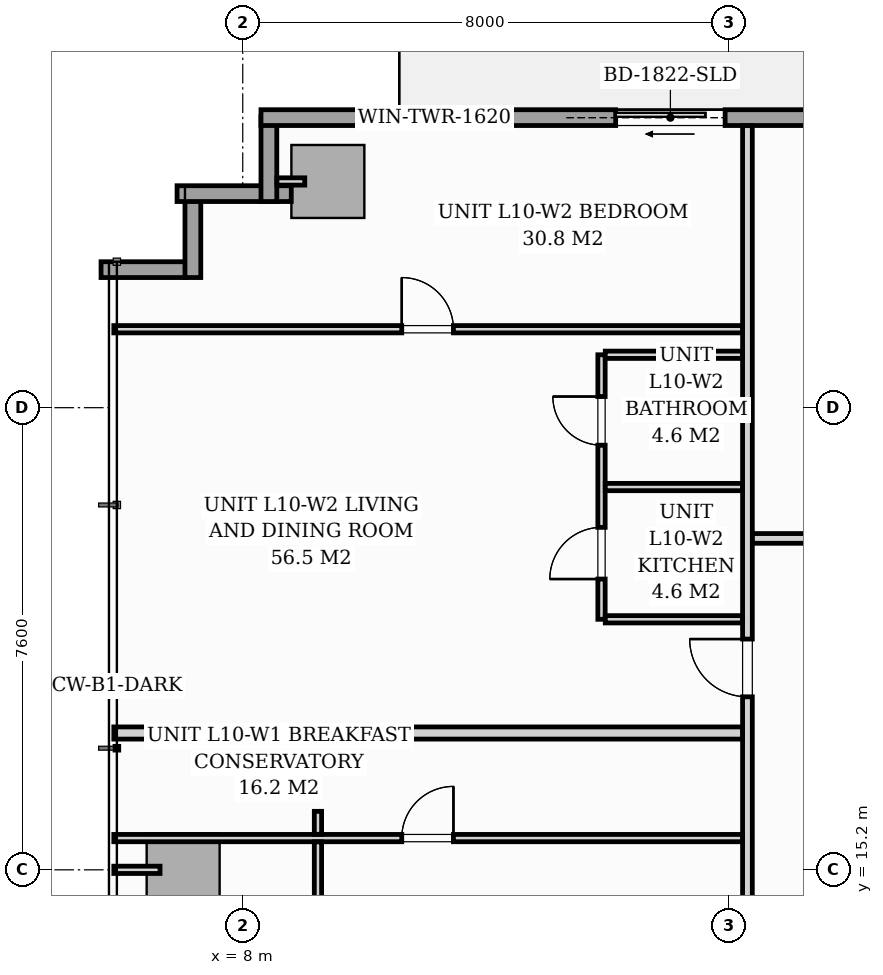
"""IFC4 building model, lengths in metres.
Left out: names, types, materials, properties, quantities, classifications, styles, units other than length and angle.
Written with IfcOpenShell. Run it as: python <this file> out.ifc"""

import sys

from ifc_helpers import new_model, si_unit, direction, frame, frame_2d, origin, origin_2d, place, context, subcontext, project, spatial, rectangle, extrude, source, transform, mapped, element, fill, save


model = new_model("IFC4")
c1 = context("Model", 3, precision=1e-05, world=origin(), true_north=direction((0.0, 1.0)))
c2 = subcontext(c1, "Body", "Model", "MODEL_VIEW")
j1 = project(units=[si_unit("LENGTHUNIT", "METRE"), si_unit("PLANEANGLEUNIT", "RADIAN")], contexts=[c1])
p1 = place(None, origin())
s1 = spatial("IfcSite", under=j1, at=p1, CompositionType="ELEMENT")
p2 = place(p1, origin())
s2 = spatial("IfcBuilding", under=s1, at=p2, CompositionType="ELEMENT")
p3 = place(p2, frame((0.0, 0.0, 39.0)))
s3 = spatial("IfcBuildingStorey", under=s2, at=p3, CompositionType="ELEMENT", Elevation=39.0)
m1 = source(origin(), c2, "Body", "SweptSolid", [
    extrude(rectangle(XDim=1.2, YDim=1.2, at=origin_2d()), origin(), (0.0, 0.0, 1.0), 3.196),
])
for number, where, z_axis, x_axis in (
    (1, (9.4, 26.52, 0.002), (0.0, 0.0, 1.0), (1.0, 0.0, 0.0)),
    (2, (7.02, 15.2, 0.002), (0.0, 0.0, 1.0), (1.0, 0.0, 0.0)),
):
    element("IfcColumn", number, at=place(p3, frame(where, z_axis=z_axis, x_axis=x_axis)), inside=s3, PredefinedType="COLUMN", context=c2, shape_type="MappedRepresentation", body=[
        mapped(m1, transform((0.0, 0.0, 0.0), scale=1.0)),
    ])
for number, where, z_axis, x_axis in (
    (3, (5.67, 25.07, 0.0), (0.0, 0.0, 1.0), (1.0, 0.0, 0.0)),
    (4, (7.18, 24.94, 0.0), (0.0, 0.0, 1.0), (0.0, 1.0, 0.0)),
):
    element("IfcWall", number, at=place(p3, frame(where, z_axis=z_axis, x_axis=x_axis)), inside=s3, PredefinedType="STANDARD", context=c2, shape_type="SweptSolid", body=[
        extrude(rectangle(XDim=1.395, YDim=0.26, at=frame_2d((0.698, 0.0))), origin(), (0.0, 0.0, 1.0), 2.94),
    ])
p4 = place(p3, frame((6.92, 26.32, 0.0), z_axis=(0.0, 0.0, 1.0), x_axis=(1.0, 0.0, 0.0)))
e5 = element("IfcWall", 5, at=p4, inside=s3, PredefinedType="STANDARD", context=c2, shape_type="SweptSolid", body=[
    extrude(rectangle(XDim=1.878, YDim=0.26, at=frame_2d((0.939, 0.0))), origin(), (0.0, 0.0, 1.0), 2.94),
])
p5 = place(p3, frame((8.43, 26.19, 0.0), z_axis=(0.0, 0.0, 1.0), x_axis=(0.0, 1.0, 0.0)))
e6 = element("IfcWall", 6, at=p5, inside=s3, PredefinedType="STANDARD", context=c2, shape_type="SweptSolid", body=[
    extrude(rectangle(XDim=1.395, YDim=0.26, at=frame_2d((0.698, 0.0))), origin(), (0.0, 0.0, 1.0), 2.94),
])
p6 = place(p3, frame((8.3, 27.57, 0.0), z_axis=(0.0, 0.0, 1.0), x_axis=(1.0, 0.0, 0.0)))
e7 = element("IfcWall", 7, at=p6, inside=s3, PredefinedType="STANDARD", context=c2, shape_type="SweptSolid", body=[
    extrude(rectangle(XDim=17.15, YDim=0.26, at=frame_2d((8.575, 0.0))), origin(), (0.0, 0.0, 1.0), 2.94),
])
p7 = place(p6, frame((5.833, 0.0, 0.0)))
e8 = element("IfcOpeningElement", 8, at=p7, cuts=e7, PredefinedType="OPENING", context=c2, shape_type="SweptSolid", body=[
    extrude(rectangle(XDim=1.8, YDim=2.06, at=frame_2d((0.9, 1.03))), frame((0.0, 0.14, 0.0), z_axis=(0.0, -1.0, 0.0), x_axis=(1.0, 0.0, 0.0)), (0.0, 0.0, 1.0), 0.28),
])
p8 = place(p6, frame((2.05, 0.0, 0.65)))
e9 = element("IfcOpeningElement", 9, at=p8, cuts=e7, PredefinedType="OPENING", context=c2, shape_type="SweptSolid", body=[
    extrude(rectangle(XDim=1.6, YDim=1.5, at=frame_2d((0.8, 0.75))), frame((0.0, 0.14, 0.0), z_axis=(0.0, -1.0, 0.0), x_axis=(1.0, 0.0, 0.0)), (0.0, 0.0, 1.0), 0.28),
])
p9 = place(p3, frame((16.3, 12.572, 0.0), z_axis=(0.0, 0.0, 1.0), x_axis=(0.0, 1.0, 0.0)))
e10 = element("IfcWall", 10, at=p9, inside=s3, PredefinedType="PARTITIONING", context=c2, shape_type="SweptSolid", body=[
    extrude(rectangle(XDim=14.866, YDim=0.16, at=frame_2d((7.433, 0.0))), origin(), (0.0, 0.0, 1.0), 2.94),
])
p10 = place(p9, frame((0.493, 0.0, 0.0)))
e11 = element("IfcOpeningElement", 11, at=p10, cuts=e10, PredefinedType="OPENING", context=c2, shape_type="SweptSolid", body=[
    extrude(rectangle(XDim=0.95, YDim=2.06, at=frame_2d((0.475, 1.03))), frame((0.0, 0.09, 0.0), z_axis=(0.0, -1.0, 0.0), x_axis=(1.0, 0.0, 0.0)), (0.0, 0.0, 1.0), 0.18),
])
p11 = place(p9, frame((5.473, 0.0, 0.0)))
e12 = element("IfcOpeningElement", 12, at=p11, cuts=e10, PredefinedType="OPENING", context=c2, shape_type="SweptSolid", body=[
    extrude(rectangle(XDim=0.95, YDim=2.06, at=frame_2d((0.475, 1.03))), frame((0.0, 0.09, 0.0), z_axis=(0.0, -1.0, 0.0), x_axis=(1.0, 0.0, 0.0)), (0.0, 0.0, 1.0), 0.18),
])
p12 = place(p3, frame((5.88, 17.45, 0.0), z_axis=(0.0, 0.0, 1.0), x_axis=(1.0, 0.0, 0.0)))
e13 = element("IfcWall", 13, at=p12, inside=s3, PredefinedType="PARTITIONING", context=c2, shape_type="SweptSolid", body=[
    extrude(rectangle(XDim=10.338, YDim=0.2, at=frame_2d((5.169, 0.0))), origin(), (0.0, 0.0, 1.0), 2.94),
])
p13 = place(p3, frame((5.88, 15.722, 0.0), z_axis=(0.0, 0.0, 1.0), x_axis=(1.0, 0.0, 0.0)))
e14 = element("IfcWall", 14, at=p13, inside=s3, PredefinedType="PARTITIONING", context=c2, shape_type="SweptSolid", body=[
    extrude(rectangle(XDim=10.338, YDim=0.12, at=frame_2d((5.169, 0.0))), origin(), (0.0, 0.0, 1.0), 2.045),
])
p14 = place(p13, frame((4.735, 0.0, 0.0)))
e15 = element("IfcOpeningElement", 15, at=p14, cuts=e14, PredefinedType="OPENING", context=c2, shape_type="SweptSolid", body=[
    extrude(rectangle(XDim=0.85, YDim=2.01, at=frame_2d((0.425, 1.005))), frame((0.0, 0.07, 0.0), z_axis=(0.0, -1.0, 0.0), x_axis=(1.0, 0.0, 0.0)), (0.0, 0.0, 1.0), 0.14),
])
p15 = place(p3, frame((9.237, 6.028, 0.0), z_axis=(0.0, 0.0, 1.0), x_axis=(0.0, 1.0, 0.0)))
e16 = element("IfcWall", 16, at=p15, inside=s3, PredefinedType="PARTITIONING", context=c2, shape_type="SweptSolid", body=[
    extrude(rectangle(XDim=9.632, YDim=0.12, at=frame_2d((4.816, 0.0))), origin(), (0.0, 0.0, 1.0), 2.94),
])
p16 = place(p15, frame((4.391, 0.0, 0.0)))
e17 = element("IfcOpeningElement", 17, at=p16, cuts=e16, PredefinedType="OPENING", context=c2, shape_type="SweptSolid", body=[
    extrude(rectangle(XDim=0.85, YDim=2.05, at=frame_2d((0.425, 1.025))), frame((0.0, 0.07, 0.0), z_axis=(0.0, -1.0, 0.0), x_axis=(1.0, 0.0, 0.0)), (0.0, 0.0, 1.0), 0.14),
])
p17 = place(p3, frame((9.237, 15.784, 0.0), z_axis=(0.0, 0.0, 1.0), x_axis=(0.0, 1.0, 0.0)))
e18 = element("IfcWall", 18, at=p17, inside=s3, PredefinedType="PARTITIONING", context=c2, shape_type="SweptSolid", body=[
    extrude(rectangle(XDim=0.378, YDim=0.12, at=frame_2d((0.189, 0.0))), origin(), (0.0, 0.0, 1.0), 2.94),
])
p18 = place(p3, frame((13.9, 19.32, 0.0), z_axis=(0.0, 0.0, 1.0), x_axis=(0.0, 1.0, 0.0)))
e19 = element("IfcWall", 19, at=p18, inside=s3, PredefinedType="PARTITIONING", context=c2, shape_type="SweptSolid", body=[
    extrude(rectangle(XDim=4.35, YDim=0.12, at=frame_2d((2.175, 0.0))), origin(), (0.0, 0.0, 1.0), 2.94),
])
p19 = place(p18, frame((0.662, 0.0, 0.0)))
e20 = element("IfcOpeningElement", 20, at=p19, cuts=e19, PredefinedType="OPENING", context=c2, shape_type="SweptSolid", body=[
    extrude(rectangle(XDim=0.85, YDim=2.05, at=frame_2d((0.425, 1.025))), frame((0.0, 0.07, 0.0), z_axis=(0.0, -1.0, 0.0), x_axis=(1.0, 0.0, 0.0)), (0.0, 0.0, 1.0), 0.14),
])
p20 = place(p18, frame((2.863, 0.0, 0.0)))
e21 = element("IfcOpeningElement", 21, at=p20, cuts=e19, PredefinedType="OPENING", context=c2, shape_type="SweptSolid", body=[
    extrude(rectangle(XDim=0.8, YDim=2.02, at=frame_2d((0.4, 1.01))), frame((0.0, 0.07, 0.0), z_axis=(0.0, -1.0, 0.0), x_axis=(1.0, 0.0, 0.0)), (0.0, 0.0, 1.0), 0.14),
])
for number, where, z_axis, x_axis in (
    (22, (13.962, 21.495, 0.0), (0.0, 0.0, 1.0), (1.0, 0.0, 0.0)),
    (23, (13.962, 19.32, 0.0), (0.0, 0.0, 1.0), (1.0, 0.0, 0.0)),
    (24, (13.962, 23.67, 0.0), (0.0, 0.0, 1.0), (1.0, 0.0, 0.0)),
):
    element("IfcWall", number, at=place(p3, frame(where, z_axis=z_axis, x_axis=x_axis)), inside=s3, PredefinedType="PARTITIONING", context=c2, shape_type="SweptSolid", body=[
        extrude(rectangle(XDim=2.256, YDim=0.12, at=frame_2d((1.128, 0.0))), origin(), (0.0, 0.0, 1.0), 2.94),
    ])
p21 = place(p3, frame((5.88, 24.09, 0.0), z_axis=(0.0, 0.0, 1.0), x_axis=(1.0, 0.0, 0.0)))
e25 = element("IfcWall", 25, at=p21, inside=s3, PredefinedType="PARTITIONING", context=c2, shape_type="SweptSolid", body=[
    extrude(rectangle(XDim=10.338, YDim=0.12, at=frame_2d((5.169, 0.0))), origin(), (0.0, 0.0, 1.0), 2.94),
])
p22 = place(p21, frame((4.735, 0.0, 0.0)))
e26 = element("IfcOpeningElement", 26, at=p22, cuts=e25, PredefinedType="OPENING", context=c2, shape_type="SweptSolid", body=[
    extrude(rectangle(XDim=0.85, YDim=2.05, at=frame_2d((0.425, 1.025))), frame((0.0, 0.07, 0.0), z_axis=(0.0, -1.0, 0.0), x_axis=(1.0, 0.0, 0.0)), (0.0, 0.0, 1.0), 0.14),
])
p23 = place(p3, frame((16.382, 20.65, 0.0), z_axis=(0.0, 0.0, 1.0), x_axis=(1.0, 0.0, 0.0)))
e27 = element("IfcWall", 27, at=p23, inside=s3, PredefinedType="PARTITIONING", context=c2, shape_type="SweptSolid", body=[
    extrude(rectangle(XDim=1.786, YDim=0.16, at=frame_2d((0.893, 0.0))), origin(), (0.0, 0.0, 1.0), 2.94),
])
p24 = place(p3, frame((9.02, 26.52, 0.0), z_axis=(0.0, 0.0, 1.0), x_axis=(-1.0, 0.0, 0.0)))
e28 = element("IfcWall", 28, at=p24, inside=s3, PredefinedType="PARTITIONING", context=c2, shape_type="SweptSolid", body=[
    extrude(rectangle(XDim=0.458, YDim=0.12, at=frame_2d((0.229, 0.0))), origin(), (0.0, 0.0, 1.0), 2.94),
])
p25 = place(p3, frame((6.64, 15.2, 0.0), z_axis=(0.0, 0.0, 1.0), x_axis=(-1.0, 0.0, 0.0)))
e29 = element("IfcWall", 29, at=p25, inside=s3, PredefinedType="PARTITIONING", context=c2, shape_type="SweptSolid", body=[
    extrude(rectangle(XDim=0.76, YDim=0.12, at=frame_2d((0.38, 0.0))), origin(), (0.0, 0.0, 1.0), 2.94),
])
m2 = source(origin(), c2, "Body", "SweptSolid", [
    extrude(rectangle(XDim=1.8, YDim=2.06, at=frame_2d((0.9, 1.03))), frame((0.0, 0.025, 0.0), z_axis=(0.0, -1.0, 0.0), x_axis=(1.0, 0.0, 0.0)), (0.0, 0.0, 1.0), 0.05),
])
p26 = place(p7, origin())
e30 = element("IfcDoor", 30, at=p26, inside=s3, OperationType="SLIDING_TO_LEFT", PredefinedType="DOOR", context=c2, shape_type="MappedRepresentation", body=[
    mapped(m2, transform((0.0, 0.0, 0.0), scale=1.0)),
])
fill(e8, e30)
m3 = source(origin(), c2, "Body", "SweptSolid", [
    extrude(rectangle(XDim=1.6, YDim=1.5, at=frame_2d((0.8, 0.75))), frame((0.0, 0.03, 0.0), z_axis=(0.0, -1.0, 0.0), x_axis=(1.0, 0.0, 0.0)), (0.0, 0.0, 1.0), 0.06),
])
p27 = place(p8, origin())
e31 = element("IfcWindow", 31, at=p27, inside=s3, PartitioningType="SINGLE_PANEL", PredefinedType="WINDOW", context=c2, shape_type="MappedRepresentation", body=[
    mapped(m3, transform((0.0, 0.0, 0.0), scale=1.0)),
])
fill(e9, e31)
m4 = source(origin(), c2, "Body", "SweptSolid", [
    extrude(rectangle(XDim=0.85, YDim=2.01, at=frame_2d((0.425, 1.005))), frame((0.0, 0.025, 0.0), z_axis=(0.0, -1.0, 0.0), x_axis=(1.0, 0.0, 0.0)), (0.0, 0.0, 1.0), 0.05),
])
p28 = place(p14, origin())
e32 = element("IfcDoor", 32, at=p28, inside=s3, OperationType="SINGLE_SWING_RIGHT", PredefinedType="DOOR", context=c2, shape_type="MappedRepresentation", body=[
    mapped(m4, transform((0.0, 0.0, 0.0), scale=1.0)),
])
fill(e15, e32)
m5 = source(origin(), c2, "Body", "SweptSolid", [
    extrude(rectangle(XDim=0.95, YDim=2.06, at=frame_2d((0.475, 1.03))), frame((0.0, 0.025, 0.0), z_axis=(0.0, -1.0, 0.0), x_axis=(1.0, 0.0, 0.0)), (0.0, 0.0, 1.0), 0.05),
])
p29 = place(p11, origin())
e33 = element("IfcDoor", 33, at=p29, inside=s3, OperationType="SINGLE_SWING_RIGHT", PredefinedType="DOOR", context=c2, shape_type="MappedRepresentation", body=[
    mapped(m5, transform((0.0, 0.0, 0.0), scale=1.0)),
])
fill(e12, e33)
m6 = source(origin(), c2, "Body", "SweptSolid", [
    extrude(rectangle(XDim=0.85, YDim=2.05, at=frame_2d((0.425, 1.025))), frame((0.0, 0.025, 0.0), z_axis=(0.0, -1.0, 0.0), x_axis=(1.0, 0.0, 0.0)), (0.0, 0.0, 1.0), 0.05),
])
p30 = place(p19, origin())
e34 = element("IfcDoor", 34, at=p30, inside=s3, OperationType="SINGLE_SWING_LEFT", PredefinedType="DOOR", context=c2, shape_type="MappedRepresentation", body=[
    mapped(m6, transform((0.0, 0.0, 0.0), scale=1.0)),
])
fill(e20, e34)
m7 = source(origin(), c2, "Body", "SweptSolid", [
    extrude(rectangle(XDim=0.8, YDim=2.02, at=frame_2d((0.4, 1.01))), frame((0.0, 0.025, 0.0), z_axis=(0.0, -1.0, 0.0), x_axis=(1.0, 0.0, 0.0)), (0.0, 0.0, 1.0), 0.05),
])
p31 = place(p20, origin())
e35 = element("IfcDoor", 35, at=p31, inside=s3, OperationType="SINGLE_SWING_RIGHT", PredefinedType="DOOR", context=c2, shape_type="MappedRepresentation", body=[
    mapped(m7, transform((0.0, 0.0, 0.0), scale=1.0)),
])
fill(e21, e35)
p32 = place(p22, origin())
e36 = element("IfcDoor", 36, at=p32, inside=s3, OperationType="SINGLE_SWING_LEFT", PredefinedType="DOOR", context=c2, shape_type="MappedRepresentation", body=[
    mapped(m6, transform((0.0, 0.0, 0.0), scale=1.0)),
])
fill(e26, e36)
save(model, sys.argv[1])
